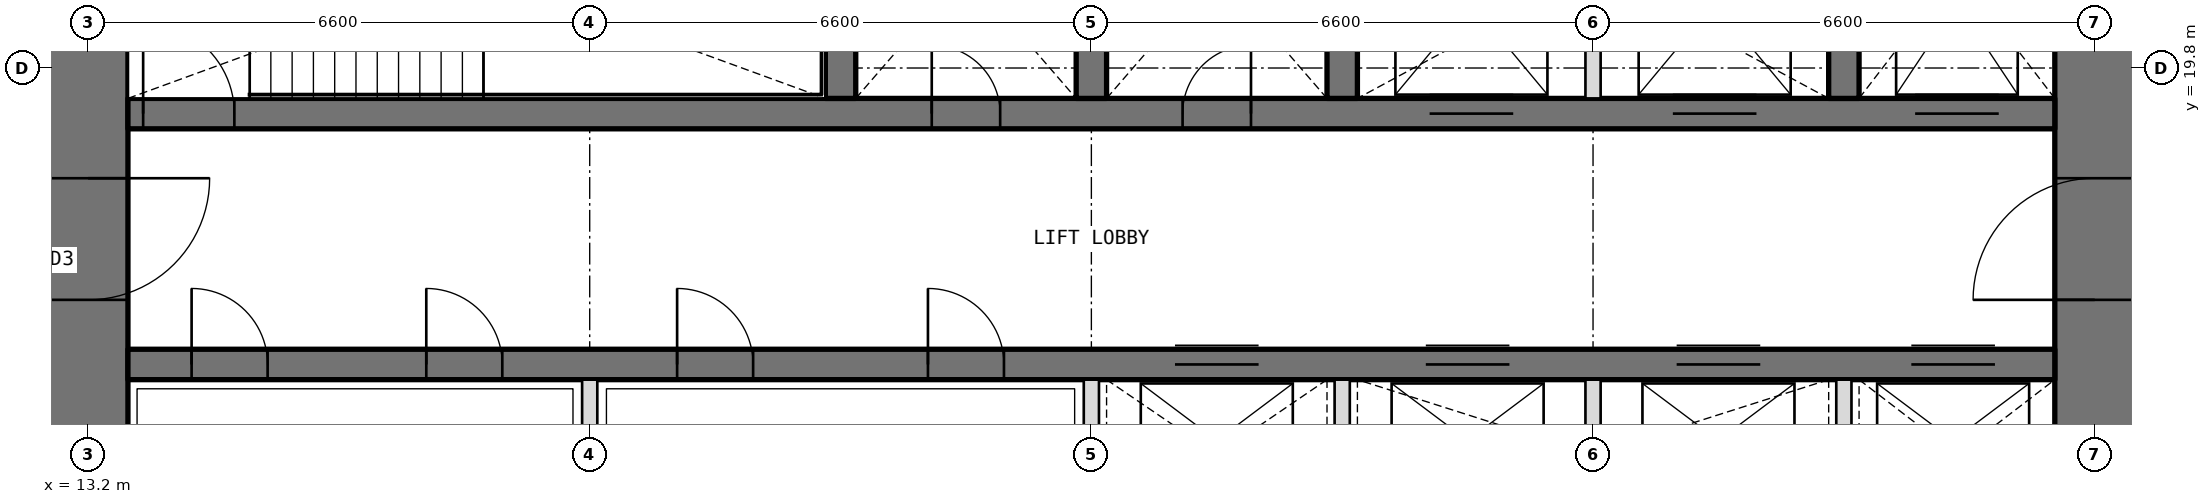
"""IFC4 building model, lengths in metres.
Left out: names, types, materials, properties, quantities, classifications, styles, units other than length and angle.
Written with IfcOpenShell. Run it as: python <this file> out.ifc"""

import sys

from ifc_helpers import new_model, si_unit, direction, frame, frame_2d, origin, place, context, subcontext, project, spatial, rectangle, extrude, element, fill, save


model = new_model("IFC4")
c1 = context("Model", 3, precision=1e-05, world=origin(), true_north=direction((0.0, 1.0)))
c2 = subcontext(c1, "Body", "Model", "MODEL_VIEW")
j1 = project(units=[si_unit("LENGTHUNIT", "METRE"), si_unit("PLANEANGLEUNIT", "RADIAN")], contexts=[c1])
p1 = place(None, origin())
s1 = spatial("IfcSite", under=j1, at=p1, CompositionType="ELEMENT")
p2 = place(p1, origin())
s2 = spatial("IfcBuilding", under=s1, at=p2, CompositionType="ELEMENT")
p3 = place(p2, frame((0.0, 0.0, 136.8)))
s3 = spatial("IfcBuildingStorey", under=s2, at=p3, CompositionType="ELEMENT", Elevation=136.8)
p4 = place(p3, frame((39.6, 13.725, 0.0), z_axis=(0.0, 0.0, 1.0), x_axis=(0.0, 1.0, 0.0)))
e1 = element("IfcWall", 1, at=p4, inside=s3, PredefinedType="SHEAR", context=c2, shape_type="SweptSolid", body=[
    extrude(rectangle(XDim=18.75, YDim=1.05, at=frame_2d((9.375, 0.0))), origin(), (0.0, 0.0, 1.0), 4.2),
])
p5 = place(p4, frame((3.025, 0.0, 0.0)))
e2 = element("IfcOpeningElement", 2, at=p5, cuts=e1, PredefinedType="OPENING", context=c2, shape_type="SweptSolid", body=[
    extrude(rectangle(XDim=1.6, YDim=2.1, at=frame_2d((0.8, 1.05))), frame((0.0, 0.535, 0.0), z_axis=(0.0, -1.0, 0.0), x_axis=(1.0, 0.0, 0.0)), (0.0, 0.0, 1.0), 1.07),
])
p6 = place(p4, frame((13.825, 0.0, 0.0)))
e3 = element("IfcOpeningElement", 3, at=p6, cuts=e1, PredefinedType="OPENING", context=c2, shape_type="SweptSolid", body=[
    extrude(rectangle(XDim=1.6, YDim=2.1, at=frame_2d((0.8, 1.05))), frame((0.0, 0.535, 0.0), z_axis=(0.0, -1.0, 0.0), x_axis=(1.0, 0.0, 0.0)), (0.0, 0.0, 1.0), 1.07),
])
p7 = place(p3, frame((13.2, 32.475, 0.0), z_axis=(0.0, 0.0, 1.0), x_axis=(0.0, -1.0, 0.0)))
e4 = element("IfcWall", 4, at=p7, inside=s3, PredefinedType="SHEAR", context=c2, shape_type="SweptSolid", body=[
    extrude(rectangle(XDim=18.75, YDim=1.05, at=frame_2d((9.375, 0.0))), origin(), (0.0, 0.0, 1.0), 4.2),
])
p8 = place(p7, frame((14.125, 0.0, 0.0)))
e5 = element("IfcOpeningElement", 5, at=p8, cuts=e4, PredefinedType="OPENING", context=c2, shape_type="SweptSolid", body=[
    extrude(rectangle(XDim=1.6, YDim=2.1, at=frame_2d((0.8, 1.05))), frame((0.0, 0.535, 0.0), z_axis=(0.0, -1.0, 0.0), x_axis=(1.0, 0.0, 0.0)), (0.0, 0.0, 1.0), 1.07),
])
p9 = place(p7, frame((3.325, 0.0, 0.0)))
e6 = element("IfcOpeningElement", 6, at=p9, cuts=e4, PredefinedType="OPENING", context=c2, shape_type="SweptSolid", body=[
    extrude(rectangle(XDim=1.6, YDim=2.1, at=frame_2d((0.8, 1.05))), frame((0.0, 0.535, 0.0), z_axis=(0.0, -1.0, 0.0), x_axis=(1.0, 0.0, 0.0)), (0.0, 0.0, 1.0), 1.07),
])
p10 = place(p3, frame((13.725, 15.9, 0.0), z_axis=(0.0, 0.0, 1.0), x_axis=(1.0, 0.0, 0.0)))
e7 = element("IfcWall", 7, at=p10, inside=s3, PredefinedType="SHEAR", context=c2, shape_type="SweptSolid", body=[
    extrude(rectangle(XDim=25.35, YDim=0.4, at=frame_2d((12.675, 0.0))), origin(), (0.0, 0.0, 1.0), 4.2),
])
p11 = place(p10, frame((0.837, 0.0, 0.0)))
e8 = element("IfcOpeningElement", 8, at=p11, cuts=e7, PredefinedType="OPENING", context=c2, shape_type="SweptSolid", body=[
    extrude(rectangle(XDim=1.0, YDim=2.1, at=frame_2d((0.5, 1.05))), frame((0.0, 0.21, 0.0), z_axis=(0.0, -1.0, 0.0), x_axis=(1.0, 0.0, 0.0)), (0.0, 0.0, 1.0), 0.42),
])
p12 = place(p10, frame((3.925, 0.0, 0.0)))
e9 = element("IfcOpeningElement", 9, at=p12, cuts=e7, PredefinedType="OPENING", context=c2, shape_type="SweptSolid", body=[
    extrude(rectangle(XDim=1.0, YDim=2.1, at=frame_2d((0.5, 1.05))), frame((0.0, 0.21, 0.0), z_axis=(0.0, -1.0, 0.0), x_axis=(1.0, 0.0, 0.0)), (0.0, 0.0, 1.0), 0.42),
])
p13 = place(p10, frame((7.225, 0.0, 0.0)))
e10 = element("IfcOpeningElement", 10, at=p13, cuts=e7, PredefinedType="OPENING", context=c2, shape_type="SweptSolid", body=[
    extrude(rectangle(XDim=1.0, YDim=2.1, at=frame_2d((0.5, 1.05))), frame((0.0, 0.21, 0.0), z_axis=(0.0, -1.0, 0.0), x_axis=(1.0, 0.0, 0.0)), (0.0, 0.0, 1.0), 0.42),
])
p14 = place(p10, frame((10.525, 0.0, 0.0)))
e11 = element("IfcOpeningElement", 11, at=p14, cuts=e7, PredefinedType="OPENING", context=c2, shape_type="SweptSolid", body=[
    extrude(rectangle(XDim=1.0, YDim=2.1, at=frame_2d((0.5, 1.05))), frame((0.0, 0.21, 0.0), z_axis=(0.0, -1.0, 0.0), x_axis=(1.0, 0.0, 0.0)), (0.0, 0.0, 1.0), 0.42),
])
p15 = place(p10, frame((13.775, 0.0, 0.0)))
e12 = element("IfcOpeningElement", 12, at=p15, cuts=e7, PredefinedType="OPENING", context=c2, shape_type="SweptSolid", body=[
    extrude(rectangle(XDim=1.1, YDim=2.1, at=frame_2d((0.55, 1.05))), frame((0.0, 0.21, 0.0), z_axis=(0.0, -1.0, 0.0), x_axis=(1.0, 0.0, 0.0)), (0.0, 0.0, 1.0), 0.42),
])
p16 = place(p10, frame((17.075, 0.0, 0.0)))
e13 = element("IfcOpeningElement", 13, at=p16, cuts=e7, PredefinedType="OPENING", context=c2, shape_type="SweptSolid", body=[
    extrude(rectangle(XDim=1.1, YDim=2.1, at=frame_2d((0.55, 1.05))), frame((0.0, 0.21, 0.0), z_axis=(0.0, -1.0, 0.0), x_axis=(1.0, 0.0, 0.0)), (0.0, 0.0, 1.0), 0.42),
])
p17 = place(p10, frame((20.375, 0.0, 0.0)))
e14 = element("IfcOpeningElement", 14, at=p17, cuts=e7, PredefinedType="OPENING", context=c2, shape_type="SweptSolid", body=[
    extrude(rectangle(XDim=1.1, YDim=2.1, at=frame_2d((0.55, 1.05))), frame((0.0, 0.21, 0.0), z_axis=(0.0, -1.0, 0.0), x_axis=(1.0, 0.0, 0.0)), (0.0, 0.0, 1.0), 0.42),
])
p18 = place(p10, frame((23.462, 0.0, 0.0)))
e15 = element("IfcOpeningElement", 15, at=p18, cuts=e7, PredefinedType="OPENING", context=c2, shape_type="SweptSolid", body=[
    extrude(rectangle(XDim=1.1, YDim=2.1, at=frame_2d((0.55, 1.05))), frame((0.0, 0.21, 0.0), z_axis=(0.0, -1.0, 0.0), x_axis=(1.0, 0.0, 0.0)), (0.0, 0.0, 1.0), 0.42),
])
p19 = place(p3, frame((13.725, 19.2, 0.0), z_axis=(0.0, 0.0, 1.0), x_axis=(1.0, 0.0, 0.0)))
e16 = element("IfcWall", 16, at=p19, inside=s3, PredefinedType="SHEAR", context=c2, shape_type="SweptSolid", body=[
    extrude(rectangle(XDim=25.35, YDim=0.4, at=frame_2d((12.675, 0.0))), origin(), (0.0, 0.0, 1.0), 4.2),
])
p20 = place(p19, frame((10.575, 0.0, 0.0)))
e17 = element("IfcOpeningElement", 17, at=p20, cuts=e16, PredefinedType="OPENING", context=c2, shape_type="SweptSolid", body=[
    extrude(rectangle(XDim=0.9, YDim=2.1, at=frame_2d((0.45, 1.05))), frame((0.0, 0.21, 0.0), z_axis=(0.0, -1.0, 0.0), x_axis=(1.0, 0.0, 0.0)), (0.0, 0.0, 1.0), 0.42),
])
p21 = place(p19, frame((13.875, 0.0, 0.0)))
e18 = element("IfcOpeningElement", 18, at=p21, cuts=e16, PredefinedType="OPENING", context=c2, shape_type="SweptSolid", body=[
    extrude(rectangle(XDim=0.9, YDim=2.1, at=frame_2d((0.45, 1.05))), frame((0.0, 0.21, 0.0), z_axis=(0.0, -1.0, 0.0), x_axis=(1.0, 0.0, 0.0)), (0.0, 0.0, 1.0), 0.42),
])
p22 = place(p19, frame((0.2, 0.0, 0.0)))
e19 = element("IfcOpeningElement", 19, at=p22, cuts=e16, PredefinedType="OPENING", context=c2, shape_type="SweptSolid", body=[
    extrude(rectangle(XDim=1.2, YDim=2.1, at=frame_2d((0.6, 1.05))), frame((0.0, 0.21, 0.0), z_axis=(0.0, -1.0, 0.0), x_axis=(1.0, 0.0, 0.0)), (0.0, 0.0, 1.0), 0.42),
])
p23 = place(p19, frame((23.512, 0.0, 0.0)))
e20 = element("IfcOpeningElement", 20, at=p23, cuts=e16, PredefinedType="OPENING", context=c2, shape_type="SweptSolid", body=[
    extrude(rectangle(XDim=1.1, YDim=2.1, at=frame_2d((0.55, 1.05))), frame((0.0, 0.21, 0.0), z_axis=(0.0, -1.0, 0.0), x_axis=(1.0, 0.0, 0.0)), (0.0, 0.0, 1.0), 0.42),
])
p24 = place(p19, frame((17.125, 0.0, 0.0)))
e21 = element("IfcOpeningElement", 21, at=p24, cuts=e16, PredefinedType="OPENING", context=c2, shape_type="SweptSolid", body=[
    extrude(rectangle(XDim=1.1, YDim=2.1, at=frame_2d((0.55, 1.05))), frame((0.0, 0.21, 0.0), z_axis=(0.0, -1.0, 0.0), x_axis=(1.0, 0.0, 0.0)), (0.0, 0.0, 1.0), 0.42),
])
p25 = place(p19, frame((20.325, 0.0, 0.0)))
e22 = element("IfcOpeningElement", 22, at=p25, cuts=e16, PredefinedType="OPENING", context=c2, shape_type="SweptSolid", body=[
    extrude(rectangle(XDim=1.1, YDim=2.1, at=frame_2d((0.55, 1.05))), frame((0.0, 0.21, 0.0), z_axis=(0.0, -1.0, 0.0), x_axis=(1.0, 0.0, 0.0)), (0.0, 0.0, 1.0), 0.42),
])
for number, where, z_axis, x_axis in (
    (23, (23.1, 19.4, 0.0), (0.0, 0.0, 1.0), (0.0, 1.0, 0.0)),
    (24, (26.4, 19.4, 0.0), (0.0, 0.0, 1.0), (0.0, 1.0, 0.0)),
    (25, (29.7, 19.4, 0.0), (0.0, 0.0, 1.0), (0.0, 1.0, 0.0)),
    (26, (36.3, 19.4, 0.0), (0.0, 0.0, 1.0), (0.0, 1.0, 0.0)),
):
    element("IfcWall", number, at=place(p3, frame(where, z_axis=z_axis, x_axis=x_axis)), inside=s3, PredefinedType="SHEAR", context=c2, shape_type="SweptSolid", body=[
        extrude(rectangle(XDim=3.35, YDim=0.4, at=frame_2d((1.675, 0.0))), origin(), (0.0, 0.0, 1.0), 4.2),
    ])
for number, where, z_axis, x_axis in (
    (27, (19.8, 13.725, 0.0), (0.0, 0.0, 1.0), (0.0, 1.0, 0.0)),
    (28, (26.4, 13.725, 0.0), (0.0, 0.0, 1.0), (0.0, 1.0, 0.0)),
    (29, (29.7, 13.725, 0.0), (0.0, 0.0, 1.0), (0.0, 1.0, 0.0)),
    (30, (33.0, 13.725, 0.0), (0.0, 0.0, 1.0), (0.0, 1.0, 0.0)),
    (31, (36.3, 13.725, 0.0), (0.0, 0.0, 1.0), (0.0, 1.0, 0.0)),
):
    element("IfcWall", number, at=place(p3, frame(where, z_axis=z_axis, x_axis=x_axis)), inside=s3, PredefinedType="PARTITIONING", context=c2, shape_type="SweptSolid", body=[
        extrude(rectangle(XDim=1.975, YDim=0.2, at=frame_2d((0.987, 0.0))), origin(), (0.0, 0.0, 1.0), 4.2),
    ])
p26 = place(p3, frame((33.0, 19.4, 0.0), z_axis=(0.0, 0.0, 1.0), x_axis=(0.0, 1.0, 0.0)))
e32 = element("IfcWall", 32, at=p26, inside=s3, PredefinedType="PARTITIONING", context=c2, shape_type="SweptSolid", body=[
    extrude(rectangle(XDim=3.35, YDim=0.2, at=frame_2d((1.675, 0.0))), origin(), (0.0, 0.0, 1.0), 4.2),
])
p27 = place(p20, origin())
e33 = element("IfcDoor", 33, at=p27, inside=s3, OperationType="SINGLE_SWING_LEFT", PredefinedType="DOOR", context=c2, shape_type="SweptSolid", body=[
    extrude(rectangle(XDim=0.9, YDim=2.1, at=frame_2d((0.45, 1.05))), frame((0.0, 0.025, 0.0), z_axis=(0.0, -1.0, 0.0), x_axis=(1.0, 0.0, 0.0)), (0.0, 0.0, 1.0), 0.05),
])
fill(e17, e33)
p28 = place(p21, origin())
e34 = element("IfcDoor", 34, at=p28, inside=s3, OperationType="SINGLE_SWING_RIGHT", PredefinedType="DOOR", context=c2, shape_type="SweptSolid", body=[
    extrude(rectangle(XDim=0.9, YDim=2.1, at=frame_2d((0.45, 1.05))), frame((0.0, 0.025, 0.0), z_axis=(0.0, -1.0, 0.0), x_axis=(1.0, 0.0, 0.0)), (0.0, 0.0, 1.0), 0.05),
])
fill(e18, e34)
p29 = place(p11, origin())
e35 = element("IfcDoor", 35, at=p29, inside=s3, OperationType="SINGLE_SWING_LEFT", PredefinedType="DOOR", context=c2, shape_type="SweptSolid", body=[
    extrude(rectangle(XDim=1.0, YDim=2.1, at=frame_2d((0.5, 1.05))), frame((0.0, 0.025, 0.0), z_axis=(0.0, -1.0, 0.0), x_axis=(1.0, 0.0, 0.0)), (0.0, 0.0, 1.0), 0.05),
])
fill(e8, e35)
p30 = place(p12, origin())
e36 = element("IfcDoor", 36, at=p30, inside=s3, OperationType="SINGLE_SWING_LEFT", PredefinedType="DOOR", context=c2, shape_type="SweptSolid", body=[
    extrude(rectangle(XDim=1.0, YDim=2.1, at=frame_2d((0.5, 1.05))), frame((0.0, 0.025, 0.0), z_axis=(0.0, -1.0, 0.0), x_axis=(1.0, 0.0, 0.0)), (0.0, 0.0, 1.0), 0.05),
])
fill(e9, e36)
p31 = place(p13, origin())
e37 = element("IfcDoor", 37, at=p31, inside=s3, OperationType="SINGLE_SWING_LEFT", PredefinedType="DOOR", context=c2, shape_type="SweptSolid", body=[
    extrude(rectangle(XDim=1.0, YDim=2.1, at=frame_2d((0.5, 1.05))), frame((0.0, 0.025, 0.0), z_axis=(0.0, -1.0, 0.0), x_axis=(1.0, 0.0, 0.0)), (0.0, 0.0, 1.0), 0.05),
])
fill(e10, e37)
p32 = place(p14, origin())
e38 = element("IfcDoor", 38, at=p32, inside=s3, OperationType="SINGLE_SWING_LEFT", PredefinedType="DOOR", context=c2, shape_type="SweptSolid", body=[
    extrude(rectangle(XDim=1.0, YDim=2.1, at=frame_2d((0.5, 1.05))), frame((0.0, 0.025, 0.0), z_axis=(0.0, -1.0, 0.0), x_axis=(1.0, 0.0, 0.0)), (0.0, 0.0, 1.0), 0.05),
])
fill(e11, e38)
p33 = place(p22, origin())
e39 = element("IfcDoor", 39, at=p33, inside=s3, OperationType="SINGLE_SWING_LEFT", PredefinedType="DOOR", context=c2, shape_type="SweptSolid", body=[
    extrude(rectangle(XDim=1.2, YDim=2.1, at=frame_2d((0.6, 1.05))), frame((0.0, 0.025, 0.0), z_axis=(0.0, -1.0, 0.0), x_axis=(1.0, 0.0, 0.0)), (0.0, 0.0, 1.0), 0.05),
])
fill(e19, e39)
p34 = place(p8, origin())
e40 = element("IfcDoor", 40, at=p34, inside=s3, OperationType="DOUBLE_DOOR_DOUBLE_SWING", PredefinedType="DOOR", context=c2, shape_type="SweptSolid", body=[
    extrude(rectangle(XDim=1.6, YDim=2.1, at=frame_2d((0.8, 1.05))), frame((0.0, 0.025, 0.0), z_axis=(0.0, -1.0, 0.0), x_axis=(1.0, 0.0, 0.0)), (0.0, 0.0, 1.0), 0.05),
])
fill(e5, e40)
p35 = place(p5, origin())
e41 = element("IfcDoor", 41, at=p35, inside=s3, OperationType="DOUBLE_DOOR_DOUBLE_SWING", PredefinedType="DOOR", context=c2, shape_type="SweptSolid", body=[
    extrude(rectangle(XDim=1.6, YDim=2.1, at=frame_2d((0.8, 1.05))), frame((0.0, 0.025, 0.0), z_axis=(0.0, -1.0, 0.0), x_axis=(1.0, 0.0, 0.0)), (0.0, 0.0, 1.0), 0.05),
])
fill(e2, e41)
p36 = place(p15, origin())
e42 = element("IfcDoor", 42, at=p36, inside=s3, OperationType="DOUBLE_DOOR_SLIDING", PredefinedType="DOOR", context=c2, shape_type="SweptSolid", body=[
    extrude(rectangle(XDim=1.1, YDim=2.1, at=frame_2d((0.55, 1.05))), frame((0.0, 0.025, 0.0), z_axis=(0.0, -1.0, 0.0), x_axis=(1.0, 0.0, 0.0)), (0.0, 0.0, 1.0), 0.05),
])
fill(e12, e42)
p37 = place(p16, origin())
e43 = element("IfcDoor", 43, at=p37, inside=s3, OperationType="DOUBLE_DOOR_SLIDING", PredefinedType="DOOR", context=c2, shape_type="SweptSolid", body=[
    extrude(rectangle(XDim=1.1, YDim=2.1, at=frame_2d((0.55, 1.05))), frame((0.0, 0.025, 0.0), z_axis=(0.0, -1.0, 0.0), x_axis=(1.0, 0.0, 0.0)), (0.0, 0.0, 1.0), 0.05),
])
fill(e13, e43)
p38 = place(p17, origin())
e44 = element("IfcDoor", 44, at=p38, inside=s3, OperationType="DOUBLE_DOOR_SLIDING", PredefinedType="DOOR", context=c2, shape_type="SweptSolid", body=[
    extrude(rectangle(XDim=1.1, YDim=2.1, at=frame_2d((0.55, 1.05))), frame((0.0, 0.025, 0.0), z_axis=(0.0, -1.0, 0.0), x_axis=(1.0, 0.0, 0.0)), (0.0, 0.0, 1.0), 0.05),
])
fill(e14, e44)
p39 = place(p18, origin())
e45 = element("IfcDoor", 45, at=p39, inside=s3, OperationType="DOUBLE_DOOR_SLIDING", PredefinedType="DOOR", context=c2, shape_type="SweptSolid", body=[
    extrude(rectangle(XDim=1.1, YDim=2.1, at=frame_2d((0.55, 1.05))), frame((0.0, 0.025, 0.0), z_axis=(0.0, -1.0, 0.0), x_axis=(1.0, 0.0, 0.0)), (0.0, 0.0, 1.0), 0.05),
])
fill(e15, e45)
p40 = place(p23, origin())
e46 = element("IfcDoor", 46, at=p40, inside=s3, OperationType="DOUBLE_DOOR_SLIDING", PredefinedType="DOOR", context=c2, shape_type="SweptSolid", body=[
    extrude(rectangle(XDim=1.1, YDim=2.1, at=frame_2d((0.55, 1.05))), frame((0.0, 0.025, 0.0), z_axis=(0.0, -1.0, 0.0), x_axis=(1.0, 0.0, 0.0)), (0.0, 0.0, 1.0), 0.05),
])
fill(e20, e46)
p41 = place(p24, origin())
e47 = element("IfcDoor", 47, at=p41, inside=s3, OperationType="DOUBLE_DOOR_SLIDING", PredefinedType="DOOR", context=c2, shape_type="SweptSolid", body=[
    extrude(rectangle(XDim=1.1, YDim=2.1, at=frame_2d((0.55, 1.05))), frame((0.0, 0.025, 0.0), z_axis=(0.0, -1.0, 0.0), x_axis=(1.0, 0.0, 0.0)), (0.0, 0.0, 1.0), 0.05),
])
fill(e21, e47)
p42 = place(p25, origin())
e48 = element("IfcDoor", 48, at=p42, inside=s3, OperationType="DOUBLE_DOOR_SLIDING", PredefinedType="DOOR", context=c2, shape_type="SweptSolid", body=[
    extrude(rectangle(XDim=1.1, YDim=2.1, at=frame_2d((0.55, 1.05))), frame((0.0, 0.025, 0.0), z_axis=(0.0, -1.0, 0.0), x_axis=(1.0, 0.0, 0.0)), (0.0, 0.0, 1.0), 0.05),
])
fill(e22, e48)
save(model, sys.argv[1])
